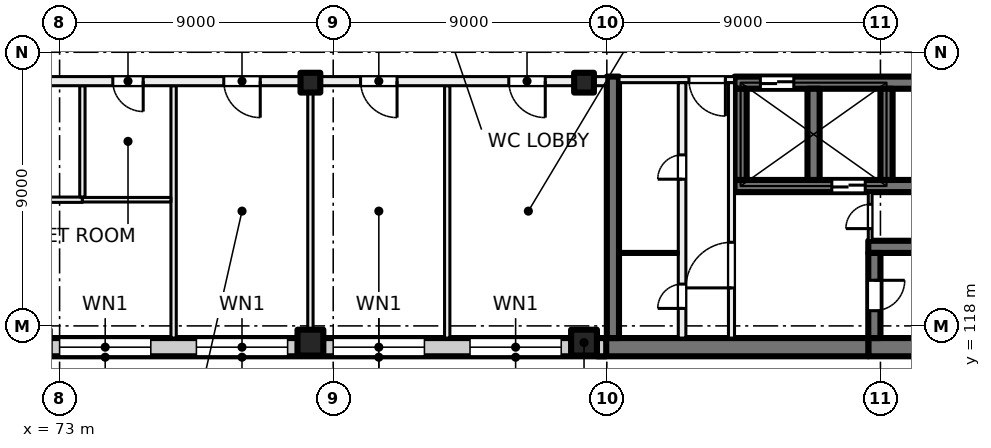
"""IFC4 building model, lengths in metres.
Left out: names, types, materials, properties, quantities, classifications, styles, units other than length and angle.
Written with IfcOpenShell. Run it as: python <this file> out.ifc"""

import sys

from ifc_helpers import new_model, si_unit, direction, frame, frame_2d, origin, origin_2d, place, context, subcontext, project, spatial, rectangle, extrude, element, fill, save


model = new_model("IFC4")
c1 = context("Model", 3, precision=1e-05, world=origin(), true_north=direction((0.0, 1.0)))
c2 = subcontext(c1, "Body", "Model", "MODEL_VIEW")
j1 = project(units=[si_unit("LENGTHUNIT", "METRE"), si_unit("PLANEANGLEUNIT", "RADIAN")], contexts=[c1])
p1 = place(None, origin())
s1 = spatial("IfcSite", under=j1, at=p1, CompositionType="ELEMENT")
p2 = place(p1, origin())
s2 = spatial("IfcBuilding", under=s1, at=p2, CompositionType="ELEMENT")
p3 = place(p2, frame((0.0, 0.0, 89.0)))
s3 = spatial("IfcBuildingStorey", under=s2, at=p3, CompositionType="ELEMENT", Elevation=89.0)
for number, where, z_axis, x_axis in (
    (1, (81.25, 126.0, 0.0), (0.0, 0.0, 1.0), (1.0, 0.0, 0.0)),
    (2, (90.25, 126.0, 0.0), (0.0, 0.0, 1.0), (1.0, 0.0, 0.0)),
):
    element("IfcColumn", number, at=place(p3, frame(where, z_axis=z_axis, x_axis=x_axis)), inside=s3, PredefinedType="COLUMN", context=c2, shape_type="SweptSolid", body=[
        extrude(rectangle(XDim=0.65, YDim=0.65, at=origin_2d()), origin(), (0.0, 0.0, 1.0), 4.0),
    ])
for number, where, z_axis, x_axis in (
    (3, (81.25, 117.45, 0.0), (0.0, 0.0, 1.0), (1.0, 0.0, 0.0)),
    (4, (90.25, 117.45, 0.0), (0.0, 0.0, 1.0), (1.0, 0.0, 0.0)),
):
    element("IfcColumn", number, at=place(p3, frame(where, z_axis=z_axis, x_axis=x_axis)), inside=s3, PredefinedType="COLUMN", context=c2, shape_type="SweptSolid", body=[
        extrude(rectangle(XDim=0.85, YDim=0.85, at=origin_2d()), origin(), (0.0, 0.0, 1.0), 4.0),
    ])
p4 = place(p3, frame((107.4, 117.3, 0.0), z_axis=(0.0, 0.0, 1.0), x_axis=(-1.0, 0.0, 0.0)))
e5 = element("IfcWall", 5, at=p4, inside=s3, PredefinedType="SHEAR", context=c2, shape_type="SweptSolid", body=[
    extrude(rectangle(XDim=7.8, YDim=0.6, at=frame_2d((3.9, 0.0))), origin(), (0.0, 0.0, 1.0), 4.0),
])
p5 = place(p3, frame((99.6, 117.3, 0.0), z_axis=(0.0, 0.0, 1.0), x_axis=(-1.0, 0.0, 0.0)))
e6 = element("IfcWall", 6, at=p5, inside=s3, PredefinedType="SHEAR", context=c2, shape_type="SweptSolid", body=[
    extrude(rectangle(XDim=8.925, YDim=0.6, at=frame_2d((4.462, 0.0))), origin(), (0.0, 0.0, 1.0), 4.0),
])
p6 = place(p3, frame((107.4, 120.6, 0.0), z_axis=(0.0, 0.0, 1.0), x_axis=(-1.0, 0.0, 0.0)))
e7 = element("IfcWall", 7, at=p6, inside=s3, PredefinedType="SHEAR", context=c2, shape_type="SweptSolid", body=[
    extrude(rectangle(XDim=7.8, YDim=0.4, at=frame_2d((3.9, 0.0))), origin(), (0.0, 0.0, 1.0), 4.0),
])
p7 = place(p3, frame((99.8, 120.4, 0.0), z_axis=(0.0, 0.0, 1.0), x_axis=(0.0, -1.0, 0.0)))
e8 = element("IfcWall", 8, at=p7, inside=s3, PredefinedType="SHEAR", context=c2, shape_type="SweptSolid", body=[
    extrude(rectangle(XDim=2.8, YDim=0.4, at=frame_2d((1.4, 0.0))), origin(), (0.0, 0.0, 1.0), 4.0),
])
p8 = place(p7, frame((0.9, 0.0, 0.0)))
e9 = element("IfcOpeningElement", 9, at=p8, cuts=e8, PredefinedType="OPENING", context=c2, shape_type="SweptSolid", body=[
    extrude(rectangle(XDim=1.0, YDim=2.1, at=frame_2d((0.5, 1.05))), frame((0.0, 0.21, 0.0), z_axis=(0.0, -1.0, 0.0), x_axis=(1.0, 0.0, 0.0)), (0.0, 0.0, 1.0), 0.42),
])
p9 = place(p3, frame((107.4, 126.0, 0.0), z_axis=(0.0, 0.0, 1.0), x_axis=(-1.0, 0.0, 0.0)))
e10 = element("IfcWall", 10, at=p9, inside=s3, PredefinedType="SHEAR", context=c2, shape_type="SweptSolid", body=[
    extrude(rectangle(XDim=12.2, YDim=0.4, at=frame_2d((6.1, 0.0))), origin(), (0.0, 0.0, 1.0), 4.0),
])
p10 = place(p9, frame((10.25, 0.0, 0.0)))
e11 = element("IfcOpeningElement", 11, at=p10, cuts=e10, PredefinedType="OPENING", context=c2, shape_type="SweptSolid", body=[
    extrude(rectangle(XDim=1.1, YDim=2.1, at=frame_2d((0.55, 1.05))), frame((0.0, 0.21, 0.0), z_axis=(0.0, -1.0, 0.0), x_axis=(1.0, 0.0, 0.0)), (0.0, 0.0, 1.0), 0.42),
])
p11 = place(p9, frame((0.7, 0.0, 0.0)))
e12 = element("IfcOpeningElement", 12, at=p11, cuts=e10, PredefinedType="OPENING", context=c2, shape_type="SweptSolid", body=[
    extrude(rectangle(XDim=0.8, YDim=2.1, at=frame_2d((0.4, 1.05))), frame((0.0, 0.21, 0.0), z_axis=(0.0, -1.0, 0.0), x_axis=(1.0, 0.0, 0.0)), (0.0, 0.0, 1.0), 0.42),
])
p12 = place(p3, frame((107.4, 122.6, 0.0), z_axis=(0.0, 0.0, 1.0), x_axis=(-1.0, 0.0, 0.0)))
e13 = element("IfcWall", 13, at=p12, inside=s3, PredefinedType="SHEAR", context=c2, shape_type="SweptSolid", body=[
    extrude(rectangle(XDim=12.2, YDim=0.4, at=frame_2d((6.1, 0.0))), origin(), (0.0, 0.0, 1.0), 4.0),
])
p13 = place(p12, frame((7.9, 0.0, 0.0)))
e14 = element("IfcOpeningElement", 14, at=p13, cuts=e13, PredefinedType="OPENING", context=c2, shape_type="SweptSolid", body=[
    extrude(rectangle(XDim=1.1, YDim=2.1, at=frame_2d((0.55, 1.05))), frame((0.0, 0.21, 0.0), z_axis=(0.0, -1.0, 0.0), x_axis=(1.0, 0.0, 0.0)), (0.0, 0.0, 1.0), 0.42),
])
for number, where, z_axis, x_axis in (
    (15, (100.2, 125.8, 0.0), (0.0, 0.0, 1.0), (0.0, -1.0, 0.0)),
    (16, (97.8, 125.8, 0.0), (0.0, 0.0, 1.0), (0.0, -1.0, 0.0)),
    (17, (95.4, 125.8, 0.0), (0.0, 0.0, 1.0), (0.0, -1.0, 0.0)),
):
    element("IfcWall", number, at=place(p3, frame(where, z_axis=z_axis, x_axis=x_axis)), inside=s3, PredefinedType="SHEAR", context=c2, shape_type="SweptSolid", body=[
        extrude(rectangle(XDim=3.0, YDim=0.4, at=frame_2d((1.5, 0.0))), origin(), (0.0, 0.0, 1.0), 4.0),
    ])
p14 = place(p3, frame((91.2, 126.2, 0.0), z_axis=(0.0, 0.0, 1.0), x_axis=(0.0, -1.0, 0.0)))
e18 = element("IfcWall", 18, at=p14, inside=s3, PredefinedType="SHEAR", context=c2, shape_type="SweptSolid", body=[
    extrude(rectangle(XDim=8.6, YDim=0.4, at=frame_2d((4.3, 0.0))), origin(), (0.0, 0.0, 1.0), 4.0),
])
p15 = place(p3, frame((90.98, 117.3, 0.0), z_axis=(0.0, 0.0, 1.0), x_axis=(-1.0, 0.0, 0.0)))
e19 = element("IfcWall", 19, at=p15, inside=s3, PredefinedType="SOLIDWALL", context=c2, shape_type="SweptSolid", body=[
    extrude(rectangle(XDim=33.745, YDim=0.6, at=frame_2d((16.873, 0.0))), origin(), (0.0, 0.0, 1.0), 3.625),
])
p16 = place(p15, frame((1.48, 0.0, 0.9)))
e20 = element("IfcOpeningElement", 20, at=p16, cuts=e19, PredefinedType="OPENING", context=c2, shape_type="SweptSolid", body=[
    extrude(rectangle(XDim=3.0, YDim=2.4, at=frame_2d((1.5, 1.2))), frame((0.0, 0.31, 0.0), z_axis=(0.0, -1.0, 0.0), x_axis=(1.0, 0.0, 0.0)), (0.0, 0.0, 1.0), 0.62),
])
p17 = place(p15, frame((5.98, 0.0, 0.9)))
e21 = element("IfcOpeningElement", 21, at=p17, cuts=e19, PredefinedType="OPENING", context=c2, shape_type="SweptSolid", body=[
    extrude(rectangle(XDim=3.0, YDim=2.4, at=frame_2d((1.5, 1.2))), frame((0.0, 0.31, 0.0), z_axis=(0.0, -1.0, 0.0), x_axis=(1.0, 0.0, 0.0)), (0.0, 0.0, 1.0), 0.62),
])
p18 = place(p15, frame((10.48, 0.0, 0.9)))
e22 = element("IfcOpeningElement", 22, at=p18, cuts=e19, PredefinedType="OPENING", context=c2, shape_type="SweptSolid", body=[
    extrude(rectangle(XDim=3.0, YDim=2.4, at=frame_2d((1.5, 1.2))), frame((0.0, 0.31, 0.0), z_axis=(0.0, -1.0, 0.0), x_axis=(1.0, 0.0, 0.0)), (0.0, 0.0, 1.0), 0.62),
])
p19 = place(p15, frame((14.98, 0.0, 0.9)))
e23 = element("IfcOpeningElement", 23, at=p19, cuts=e19, PredefinedType="OPENING", context=c2, shape_type="SweptSolid", body=[
    extrude(rectangle(XDim=3.0, YDim=2.4, at=frame_2d((1.5, 1.2))), frame((0.0, 0.31, 0.0), z_axis=(0.0, -1.0, 0.0), x_axis=(1.0, 0.0, 0.0)), (0.0, 0.0, 1.0), 0.62),
])
p20 = place(p15, frame((19.48, 0.0, 0.9)))
e24 = element("IfcOpeningElement", 24, at=p20, cuts=e19, PredefinedType="OPENING", context=c2, shape_type="SweptSolid", body=[
    extrude(rectangle(XDim=3.0, YDim=2.4, at=frame_2d((1.5, 1.2))), frame((0.0, 0.31, 0.0), z_axis=(0.0, -1.0, 0.0), x_axis=(1.0, 0.0, 0.0)), (0.0, 0.0, 1.0), 0.62),
])
p21 = place(p15, frame((23.98, 0.0, 0.9)))
e25 = element("IfcOpeningElement", 25, at=p21, cuts=e19, PredefinedType="OPENING", context=c2, shape_type="SweptSolid", body=[
    extrude(rectangle(XDim=3.0, YDim=2.4, at=frame_2d((1.5, 1.2))), frame((0.0, 0.31, 0.0), z_axis=(0.0, -1.0, 0.0), x_axis=(1.0, 0.0, 0.0)), (0.0, 0.0, 1.0), 0.62),
])
p22 = place(p15, frame((28.48, 0.0, 0.9)))
e26 = element("IfcOpeningElement", 26, at=p22, cuts=e19, PredefinedType="OPENING", context=c2, shape_type="SweptSolid", body=[
    extrude(rectangle(XDim=3.0, YDim=2.4, at=frame_2d((1.5, 1.2))), frame((0.0, 0.31, 0.0), z_axis=(0.0, -1.0, 0.0), x_axis=(1.0, 0.0, 0.0)), (0.0, 0.0, 1.0), 0.62),
])
p23 = place(p3, frame((95.2, 126.1, 0.0), z_axis=(0.0, 0.0, 1.0), x_axis=(-1.0, 0.0, 0.0)))
e27 = element("IfcWall", 27, at=p23, inside=s3, PredefinedType="PARTITIONING", context=c2, shape_type="SweptSolid", body=[
    extrude(rectangle(XDim=3.8, YDim=0.2, at=frame_2d((1.9, 0.0))), origin(), (0.0, 0.0, 1.0), 3.625),
])
p24 = place(p23, frame((0.3, 0.0, 0.0)))
e28 = element("IfcOpeningElement", 28, at=p24, cuts=e27, PredefinedType="OPENING", context=c2, shape_type="SweptSolid", body=[
    extrude(rectangle(XDim=1.2, YDim=2.1, at=frame_2d((0.6, 1.05))), frame((0.0, 0.11, 0.0), z_axis=(0.0, -1.0, 0.0), x_axis=(1.0, 0.0, 0.0)), (0.0, 0.0, 1.0), 0.22),
])
p25 = place(p3, frame((95.1, 117.6, 0.0), z_axis=(0.0, 0.0, 1.0), x_axis=(0.0, 1.0, 0.0)))
e29 = element("IfcWall", 29, at=p25, inside=s3, PredefinedType="PARTITIONING", context=c2, shape_type="SweptSolid", body=[
    extrude(rectangle(XDim=8.4, YDim=0.2, at=frame_2d((4.2, 0.0))), origin(), (0.0, 0.0, 1.0), 3.625),
])
p26 = place(p25, frame((1.65, 0.0, 0.0)))
e30 = element("IfcOpeningElement", 30, at=p26, cuts=e29, PredefinedType="OPENING", context=c2, shape_type="SweptSolid", body=[
    extrude(rectangle(XDim=1.5, YDim=2.1, at=frame_2d((0.75, 1.05))), frame((0.0, 0.11, 0.0), z_axis=(0.0, -1.0, 0.0), x_axis=(1.0, 0.0, 0.0)), (0.0, 0.0, 1.0), 0.22),
])
p27 = place(p3, frame((93.475, 117.6, 0.0), z_axis=(0.0, 0.0, 1.0), x_axis=(0.0, 1.0, 0.0)))
e31 = element("IfcWall", 31, at=p27, inside=s3, PredefinedType="PARTITIONING", context=c2, shape_type="SweptSolid", body=[
    extrude(rectangle(XDim=8.4, YDim=0.25, at=frame_2d((4.2, 0.0))), origin(), (0.0, 0.0, 1.0), 3.625),
])
p28 = place(p27, frame((5.225, 0.0, 0.0)))
e32 = element("IfcOpeningElement", 32, at=p28, cuts=e31, PredefinedType="OPENING", context=c2, shape_type="SweptSolid", body=[
    extrude(rectangle(XDim=0.8, YDim=2.1, at=frame_2d((0.4, 1.05))), frame((0.0, 0.135, 0.0), z_axis=(0.0, -1.0, 0.0), x_axis=(1.0, 0.0, 0.0)), (0.0, 0.0, 1.0), 0.27),
])
p29 = place(p27, frame((0.975, 0.0, 0.0)))
e33 = element("IfcOpeningElement", 33, at=p29, cuts=e31, PredefinedType="OPENING", context=c2, shape_type="SweptSolid", body=[
    extrude(rectangle(XDim=0.8, YDim=2.1, at=frame_2d((0.4, 1.05))), frame((0.0, 0.135, 0.0), z_axis=(0.0, -1.0, 0.0), x_axis=(1.0, 0.0, 0.0)), (0.0, 0.0, 1.0), 0.27),
])
p30 = place(p3, frame((99.663, 120.8, 0.0), z_axis=(0.0, 0.0, 1.0), x_axis=(0.0, 1.0, 0.0)))
e34 = element("IfcWall", 34, at=p30, inside=s3, PredefinedType="PARTITIONING", context=c2, shape_type="SweptSolid", body=[
    extrude(rectangle(XDim=1.6, YDim=0.125, at=frame_2d((0.8, 0.0))), origin(), (0.0, 0.0, 1.0), 3.625),
])
p31 = place(p30, frame((0.4, 0.0, 0.0)))
e35 = element("IfcOpeningElement", 35, at=p31, cuts=e34, PredefinedType="OPENING", context=c2, shape_type="SweptSolid", body=[
    extrude(rectangle(XDim=0.8, YDim=2.1, at=frame_2d((0.4, 1.05))), frame((0.0, 0.073, 0.0), z_axis=(0.0, -1.0, 0.0), x_axis=(1.0, 0.0, 0.0)), (0.0, 0.0, 1.0), 0.145),
])
p32 = place(p3, frame((93.35, 120.4, 0.0), z_axis=(0.0, 0.0, 1.0), x_axis=(-1.0, 0.0, 0.0)))
e36 = element("IfcWall", 36, at=p32, inside=s3, PredefinedType="PARTITIONING", context=c2, shape_type="SweptSolid", body=[
    extrude(rectangle(XDim=1.95, YDim=0.1, at=frame_2d((0.975, 0.0))), origin(), (0.0, 0.0, 1.0), 3.625),
])
p33 = place(p3, frame((73.75, 122.15, 0.0), z_axis=(0.0, 0.0, 1.0), x_axis=(-1.0, 0.0, 0.0)))
e37 = element("IfcWall", 37, at=p33, inside=s3, PredefinedType="PARTITIONING", context=c2, shape_type="SweptSolid", body=[
    extrude(rectangle(XDim=4.588, YDim=0.175, at=frame_2d((2.294, 0.0))), origin(), (0.0, 0.0, 1.0), 3.625),
])
p34 = place(p3, frame((73.75, 125.9, 0.0), z_axis=(0.0, 0.0, 1.0), x_axis=(0.0, -1.0, 0.0)))
e38 = element("IfcWall", 38, at=p34, inside=s3, PredefinedType="PARTITIONING", context=c2, shape_type="SweptSolid", body=[
    extrude(rectangle(XDim=3.662, YDim=0.175, at=frame_2d((1.831, 0.0))), origin(), (0.0, 0.0, 1.0), 3.625),
])
p35 = place(p3, frame((76.75, 117.6, 0.0), z_axis=(0.0, 0.0, 1.0), x_axis=(0.0, 1.0, 0.0)))
e39 = element("IfcWall", 39, at=p35, inside=s3, PredefinedType="PARTITIONING", context=c2, shape_type="SweptSolid", body=[
    extrude(rectangle(XDim=8.3, YDim=0.175, at=frame_2d((4.15, 0.0))), origin(), (0.0, 0.0, 1.0), 3.625),
])
p36 = place(p3, frame((76.662, 122.15, 0.0), z_axis=(0.0, 0.0, 1.0), x_axis=(-1.0, 0.0, 0.0)))
e40 = element("IfcWall", 40, at=p36, inside=s3, PredefinedType="PARTITIONING", context=c2, shape_type="SweptSolid", body=[
    extrude(rectangle(XDim=2.912, YDim=0.15, at=frame_2d((1.456, 0.0))), origin(), (0.0, 0.0, 1.0), 3.625),
])
for number, where, z_axis, x_axis in (
    (41, (81.25, 117.6, 0.0), (0.0, 0.0, 1.0), (0.0, 1.0, 0.0)),
    (42, (85.75, 117.6, 0.0), (0.0, 0.0, 1.0), (0.0, 1.0, 0.0)),
):
    element("IfcWall", number, at=place(p3, frame(where, z_axis=z_axis, x_axis=x_axis)), inside=s3, PredefinedType="PARTITIONING", context=c2, shape_type="SweptSolid", body=[
        extrude(rectangle(XDim=8.3, YDim=0.175, at=frame_2d((4.15, 0.0))), origin(), (0.0, 0.0, 1.0), 3.625),
    ])
p37 = place(p3, frame((91.0, 126.05, 0.0), z_axis=(0.0, 0.0, 1.0), x_axis=(-1.0, 0.0, 0.0)))
e43 = element("IfcWall", 43, at=p37, inside=s3, PredefinedType="PARTITIONING", context=c2, shape_type="SweptSolid", body=[
    extrude(rectangle(XDim=43.785, YDim=0.3, at=frame_2d((21.893, 0.0))), origin(), (0.0, 0.0, 1.0), 3.625),
])
p38 = place(p37, frame((2.025, 0.0, 0.0)))
e44 = element("IfcOpeningElement", 44, at=p38, cuts=e43, PredefinedType="OPENING", context=c2, shape_type="SweptSolid", body=[
    extrude(rectangle(XDim=1.2, YDim=2.1, at=frame_2d((0.6, 1.05))), frame((0.0, 0.16, 0.0), z_axis=(0.0, -1.0, 0.0), x_axis=(1.0, 0.0, 0.0)), (0.0, 0.0, 1.0), 0.32),
])
p39 = place(p37, frame((6.9, 0.0, 0.0)))
e45 = element("IfcOpeningElement", 45, at=p39, cuts=e43, PredefinedType="OPENING", context=c2, shape_type="SweptSolid", body=[
    extrude(rectangle(XDim=1.2, YDim=2.1, at=frame_2d((0.6, 1.05))), frame((0.0, 0.16, 0.0), z_axis=(0.0, -1.0, 0.0), x_axis=(1.0, 0.0, 0.0)), (0.0, 0.0, 1.0), 0.32),
])
p40 = place(p37, frame((11.4, 0.0, 0.0)))
e46 = element("IfcOpeningElement", 46, at=p40, cuts=e43, PredefinedType="OPENING", context=c2, shape_type="SweptSolid", body=[
    extrude(rectangle(XDim=1.2, YDim=2.1, at=frame_2d((0.6, 1.05))), frame((0.0, 0.16, 0.0), z_axis=(0.0, -1.0, 0.0), x_axis=(1.0, 0.0, 0.0)), (0.0, 0.0, 1.0), 0.32),
])
p41 = place(p37, frame((15.25, 0.0, 0.0)))
e47 = element("IfcOpeningElement", 47, at=p41, cuts=e43, PredefinedType="OPENING", context=c2, shape_type="SweptSolid", body=[
    extrude(rectangle(XDim=1.0, YDim=2.1, at=frame_2d((0.5, 1.05))), frame((0.0, 0.16, 0.0), z_axis=(0.0, -1.0, 0.0), x_axis=(1.0, 0.0, 0.0)), (0.0, 0.0, 1.0), 0.32),
])
p42 = place(p37, frame((19.9, 0.0, 0.0)))
e48 = element("IfcOpeningElement", 48, at=p42, cuts=e43, PredefinedType="OPENING", context=c2, shape_type="SweptSolid", body=[
    extrude(rectangle(XDim=1.2, YDim=2.1, at=frame_2d((0.6, 1.05))), frame((0.0, 0.16, 0.0), z_axis=(0.0, -1.0, 0.0), x_axis=(1.0, 0.0, 0.0)), (0.0, 0.0, 1.0), 0.32),
])
p43 = place(p37, frame((23.85, 0.0, 0.0)))
e49 = element("IfcOpeningElement", 49, at=p43, cuts=e43, PredefinedType="OPENING", context=c2, shape_type="SweptSolid", body=[
    extrude(rectangle(XDim=1.8, YDim=2.1, at=frame_2d((0.9, 1.05))), frame((0.0, 0.16, 0.0), z_axis=(0.0, -1.0, 0.0), x_axis=(1.0, 0.0, 0.0)), (0.0, 0.0, 1.0), 0.32),
])
p44 = place(p37, frame((34.0, 0.0, 0.0)))
e50 = element("IfcOpeningElement", 50, at=p44, cuts=e43, PredefinedType="OPENING", context=c2, shape_type="SweptSolid", body=[
    extrude(rectangle(XDim=1.0, YDim=2.1, at=frame_2d((0.5, 1.05))), frame((0.0, 0.16, 0.0), z_axis=(0.0, -1.0, 0.0), x_axis=(1.0, 0.0, 0.0)), (0.0, 0.0, 1.0), 0.32),
])
p45 = place(p37, frame((39.296, 0.0, 0.0)))
e51 = element("IfcOpeningElement", 51, at=p45, cuts=e43, PredefinedType="OPENING", context=c2, shape_type="SweptSolid", body=[
    extrude(rectangle(XDim=1.8, YDim=2.1, at=frame_2d((0.9, 1.05))), frame((0.0, 0.16, 0.0), z_axis=(0.0, -1.0, 0.0), x_axis=(1.0, 0.0, 0.0)), (0.0, 0.0, 1.0), 0.32),
])
p46 = place(p16, origin())
e52 = element("IfcWindow", 52, at=p46, inside=s3, PartitioningType="SINGLE_PANEL", PredefinedType="WINDOW", context=c2, shape_type="SweptSolid", body=[
    extrude(rectangle(XDim=3.0, YDim=2.4, at=frame_2d((1.5, 1.2))), frame((0.0, 0.03, 0.0), z_axis=(0.0, -1.0, 0.0), x_axis=(1.0, 0.0, 0.0)), (0.0, 0.0, 1.0), 0.06),
])
fill(e20, e52)
p47 = place(p17, origin())
e53 = element("IfcWindow", 53, at=p47, inside=s3, PartitioningType="SINGLE_PANEL", PredefinedType="WINDOW", context=c2, shape_type="SweptSolid", body=[
    extrude(rectangle(XDim=3.0, YDim=2.4, at=frame_2d((1.5, 1.2))), frame((0.0, 0.03, 0.0), z_axis=(0.0, -1.0, 0.0), x_axis=(1.0, 0.0, 0.0)), (0.0, 0.0, 1.0), 0.06),
])
fill(e21, e53)
p48 = place(p18, origin())
e54 = element("IfcWindow", 54, at=p48, inside=s3, PartitioningType="SINGLE_PANEL", PredefinedType="WINDOW", context=c2, shape_type="SweptSolid", body=[
    extrude(rectangle(XDim=3.0, YDim=2.4, at=frame_2d((1.5, 1.2))), frame((0.0, 0.03, 0.0), z_axis=(0.0, -1.0, 0.0), x_axis=(1.0, 0.0, 0.0)), (0.0, 0.0, 1.0), 0.06),
])
fill(e22, e54)
p49 = place(p19, origin())
e55 = element("IfcWindow", 55, at=p49, inside=s3, PartitioningType="SINGLE_PANEL", PredefinedType="WINDOW", context=c2, shape_type="SweptSolid", body=[
    extrude(rectangle(XDim=3.0, YDim=2.4, at=frame_2d((1.5, 1.2))), frame((0.0, 0.03, 0.0), z_axis=(0.0, -1.0, 0.0), x_axis=(1.0, 0.0, 0.0)), (0.0, 0.0, 1.0), 0.06),
])
fill(e23, e55)
p50 = place(p10, origin())
e56 = element("IfcDoor", 56, at=p50, inside=s3, OperationType="DOUBLE_DOOR_SLIDING", PredefinedType="DOOR", context=c2, shape_type="SweptSolid", body=[
    extrude(rectangle(XDim=1.1, YDim=2.1, at=frame_2d((0.55, 1.05))), frame((0.0, 0.025, 0.0), z_axis=(0.0, -1.0, 0.0), x_axis=(1.0, 0.0, 0.0)), (0.0, 0.0, 1.0), 0.05),
])
fill(e11, e56)
p51 = place(p24, origin())
e57 = element("IfcDoor", 57, at=p51, inside=s3, OperationType="DOUBLE_DOOR_SINGLE_SWING", PredefinedType="DOOR", context=c2, shape_type="SweptSolid", body=[
    extrude(rectangle(XDim=1.2, YDim=2.1, at=frame_2d((0.6, 1.05))), frame((0.0, 0.025, 0.0), z_axis=(0.0, -1.0, 0.0), x_axis=(1.0, 0.0, 0.0)), (0.0, 0.0, 1.0), 0.05),
])
fill(e28, e57)
p52 = place(p26, origin())
e58 = element("IfcDoor", 58, at=p52, inside=s3, OperationType="DOUBLE_DOOR_SINGLE_SWING", PredefinedType="DOOR", context=c2, shape_type="SweptSolid", body=[
    extrude(rectangle(XDim=1.5, YDim=2.1, at=frame_2d((0.75, 1.05))), frame((0.0, 0.025, 0.0), z_axis=(0.0, -1.0, 0.0), x_axis=(1.0, 0.0, 0.0)), (0.0, 0.0, 1.0), 0.05),
])
fill(e30, e58)
p53 = place(p8, origin())
e59 = element("IfcDoor", 59, at=p53, inside=s3, OperationType="SINGLE_SWING_LEFT", PredefinedType="DOOR", context=c2, shape_type="SweptSolid", body=[
    extrude(rectangle(XDim=1.0, YDim=2.1, at=frame_2d((0.5, 1.05))), frame((0.0, 0.025, 0.0), z_axis=(0.0, -1.0, 0.0), x_axis=(1.0, 0.0, 0.0)), (0.0, 0.0, 1.0), 0.05),
])
fill(e9, e59)
p54 = place(p31, origin())
e60 = element("IfcDoor", 60, at=p54, inside=s3, OperationType="SINGLE_SWING_RIGHT", PredefinedType="DOOR", context=c2, shape_type="SweptSolid", body=[
    extrude(rectangle(XDim=0.8, YDim=2.1, at=frame_2d((0.4, 1.05))), frame((0.0, 0.025, 0.0), z_axis=(0.0, -1.0, 0.0), x_axis=(1.0, 0.0, 0.0)), (0.0, 0.0, 1.0), 0.05),
])
fill(e35, e60)
p55 = place(p28, origin())
e61 = element("IfcDoor", 61, at=p55, inside=s3, OperationType="SINGLE_SWING_LEFT", PredefinedType="DOOR", context=c2, shape_type="SweptSolid", body=[
    extrude(rectangle(XDim=0.8, YDim=2.1, at=frame_2d((0.4, 1.05))), frame((0.0, 0.025, 0.0), z_axis=(0.0, -1.0, 0.0), x_axis=(1.0, 0.0, 0.0)), (0.0, 0.0, 1.0), 0.05),
])
fill(e32, e61)
p56 = place(p29, origin())
e62 = element("IfcDoor", 62, at=p56, inside=s3, OperationType="SINGLE_SWING_RIGHT", PredefinedType="DOOR", context=c2, shape_type="SweptSolid", body=[
    extrude(rectangle(XDim=0.8, YDim=2.1, at=frame_2d((0.4, 1.05))), frame((0.0, 0.025, 0.0), z_axis=(0.0, -1.0, 0.0), x_axis=(1.0, 0.0, 0.0)), (0.0, 0.0, 1.0), 0.05),
])
fill(e33, e62)
p57 = place(p13, origin())
e63 = element("IfcDoor", 63, at=p57, inside=s3, OperationType="DOUBLE_DOOR_SLIDING", PredefinedType="DOOR", context=c2, shape_type="SweptSolid", body=[
    extrude(rectangle(XDim=1.1, YDim=2.1, at=frame_2d((0.55, 1.05))), frame((0.0, 0.025, 0.0), z_axis=(0.0, -1.0, 0.0), x_axis=(1.0, 0.0, 0.0)), (0.0, 0.0, 1.0), 0.05),
])
fill(e14, e63)
p58 = place(p38, origin())
e64 = element("IfcDoor", 64, at=p58, inside=s3, OperationType="DOUBLE_DOOR_SINGLE_SWING", PredefinedType="DOOR", context=c2, shape_type="SweptSolid", body=[
    extrude(rectangle(XDim=1.2, YDim=2.1, at=frame_2d((0.6, 1.05))), frame((0.0, 0.025, 0.0), z_axis=(0.0, -1.0, 0.0), x_axis=(1.0, 0.0, 0.0)), (0.0, 0.0, 1.0), 0.05),
])
fill(e44, e64)
p59 = place(p39, origin())
e65 = element("IfcDoor", 65, at=p59, inside=s3, OperationType="DOUBLE_DOOR_SINGLE_SWING", PredefinedType="DOOR", context=c2, shape_type="SweptSolid", body=[
    extrude(rectangle(XDim=1.2, YDim=2.1, at=frame_2d((0.6, 1.05))), frame((0.0, 0.025, 0.0), z_axis=(0.0, -1.0, 0.0), x_axis=(1.0, 0.0, 0.0)), (0.0, 0.0, 1.0), 0.05),
])
fill(e45, e65)
p60 = place(p40, origin())
e66 = element("IfcDoor", 66, at=p60, inside=s3, OperationType="DOUBLE_DOOR_SINGLE_SWING", PredefinedType="DOOR", context=c2, shape_type="SweptSolid", body=[
    extrude(rectangle(XDim=1.2, YDim=2.1, at=frame_2d((0.6, 1.05))), frame((0.0, 0.025, 0.0), z_axis=(0.0, -1.0, 0.0), x_axis=(1.0, 0.0, 0.0)), (0.0, 0.0, 1.0), 0.05),
])
fill(e46, e66)
p61 = place(p41, origin())
e67 = element("IfcDoor", 67, at=p61, inside=s3, OperationType="SINGLE_SWING_LEFT", PredefinedType="DOOR", context=c2, shape_type="SweptSolid", body=[
    extrude(rectangle(XDim=1.0, YDim=2.1, at=frame_2d((0.5, 1.05))), frame((0.0, 0.025, 0.0), z_axis=(0.0, -1.0, 0.0), x_axis=(1.0, 0.0, 0.0)), (0.0, 0.0, 1.0), 0.05),
])
fill(e47, e67)
save(model, sys.argv[1])
